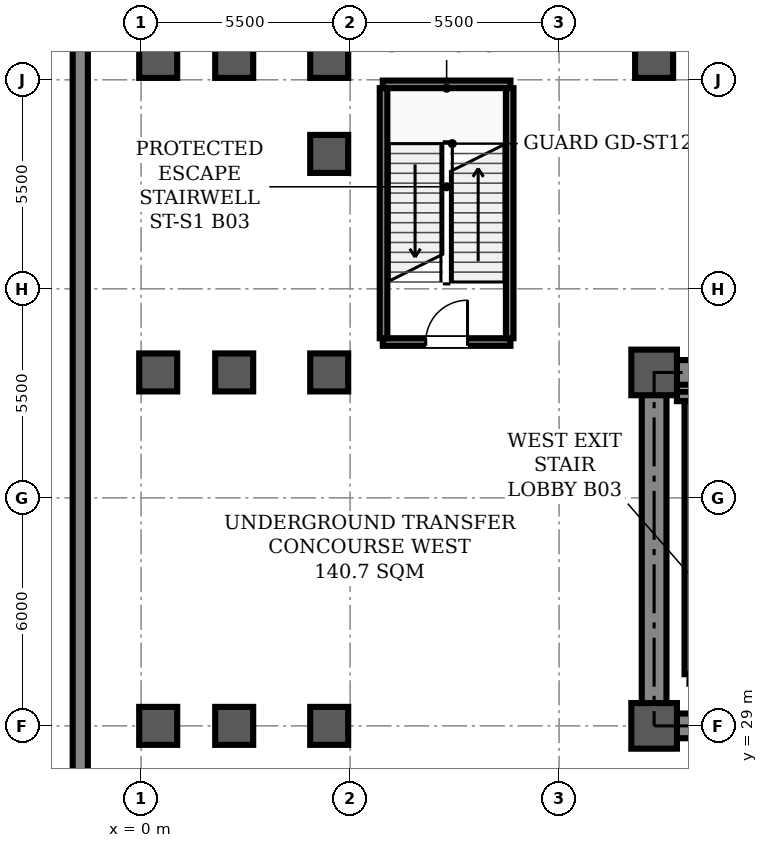
"""IFC4 building model, lengths in metres.
Left out: names, types, materials, properties, quantities, classifications, styles, units other than length and angle.
Written with IfcOpenShell. Run it as: python <this file> out.ifc"""

import sys

from ifc_helpers import new_model, si_unit, direction, frame, frame_2d, origin, origin_2d, place, context, subcontext, project, spatial, rectangle, hollow_rectangle, extrude, element, fill, save


model = new_model("IFC4")
c1 = context("Model", 3, precision=1e-05, world=origin(), true_north=direction((0.0, 1.0)))
c2 = subcontext(c1, "Body", "Model", "MODEL_VIEW")
j1 = project(units=[si_unit("LENGTHUNIT", "METRE"), si_unit("PLANEANGLEUNIT", "RADIAN")], contexts=[c1])
p1 = place(None, origin())
s1 = spatial("IfcSite", under=j1, at=p1, CompositionType="ELEMENT")
p2 = place(p1, origin())
s2 = spatial("IfcBuilding", under=s1, at=p2, CompositionType="ELEMENT")
p3 = place(p2, frame((0.0, 0.0, -15.6)))
s3 = spatial("IfcBuildingStorey", under=s2, at=p3, CompositionType="ELEMENT", Elevation=-15.6)
for number, where, z_axis, x_axis in (
    (1, (13.5, 29.0, 0.0), (0.0, 0.0, 1.0), (1.0, 0.0, 0.0)),
    (2, (13.5, 38.3, 0.0), (0.0, 0.0, 1.0), (1.0, 0.0, 0.0)),
):
    element("IfcColumn", number, at=place(p3, frame(where, z_axis=z_axis, x_axis=x_axis)), inside=s3, PredefinedType="COLUMN", context=c2, shape_type="SweptSolid", body=[
        extrude(hollow_rectangle(XDim=1.2, YDim=1.2, WallThickness=0.04, InnerFilletRadius=0.02, OuterFilletRadius=0.06, at=origin_2d()), origin(), (0.0, 0.0, 1.0), 5.4),
    ])
for number, where, z_axis, x_axis in (
    (3, (0.45, 29.0, 0.0), (0.0, 0.0, 1.0), (1.0, 0.0, 0.0)),
    (4, (0.45, 38.3, 0.0), (0.0, 0.0, 1.0), (1.0, 0.0, 0.0)),
    (5, (0.45, 46.55, 0.0), (0.0, 0.0, 1.0), (1.0, 0.0, 0.0)),
    (6, (2.45, 29.0, 0.0), (0.0, 0.0, 1.0), (1.0, 0.0, 0.0)),
    (7, (2.45, 38.3, 0.0), (0.0, 0.0, 1.0), (1.0, 0.0, 0.0)),
    (8, (2.45, 46.55, 0.0), (0.0, 0.0, 1.0), (1.0, 0.0, 0.0)),
    (9, (4.95, 29.0, 0.0), (0.0, 0.0, 1.0), (1.0, 0.0, 0.0)),
    (10, (4.95, 38.3, 0.0), (0.0, 0.0, 1.0), (1.0, 0.0, 0.0)),
    (11, (4.95, 44.05, 0.0), (0.0, 0.0, 1.0), (1.0, 0.0, 0.0)),
    (12, (4.95, 46.55, 0.0), (0.0, 0.0, 1.0), (1.0, 0.0, 0.0)),
    (13, (13.5, 46.55, 0.0), (0.0, 0.0, 1.0), (1.0, 0.0, 0.0)),
):
    element("IfcColumn", number, at=place(p3, frame(where, z_axis=z_axis, x_axis=x_axis)), inside=s3, PredefinedType="COLUMN", context=c2, shape_type="SweptSolid", body=[
        extrude(rectangle(XDim=1.0, YDim=1.0, at=origin_2d()), origin(), (0.0, 0.0, 1.0), 5.4),
    ])
p4 = place(p3, frame((-1.6, 51.4, 0.0), z_axis=(0.0, 0.0, 1.0), x_axis=(0.0, -1.0, 0.0)))
e14 = element("IfcWall", 14, at=p4, inside=s3, PredefinedType="SOLIDWALL", context=c2, shape_type="SweptSolid", body=[
    extrude(rectangle(XDim=51.2, YDim=0.4, at=frame_2d((25.6, 0.0))), origin(), (0.0, 0.0, 1.0), 5.12),
])
p5 = place(p3, frame((13.5, 29.0, 0.0), z_axis=(0.0, 0.0, 1.0), x_axis=(1.0, 0.0, 0.0)))
e15 = element("IfcWall", 15, at=p5, inside=s3, PredefinedType="SHEAR", context=c2, shape_type="SweptSolid", body=[
    extrude(rectangle(XDim=30.5, YDim=0.65, at=frame_2d((15.25, 0.0))), origin(), (0.0, 0.0, 1.0), 5.12),
])
p6 = place(p5, frame((1.75, 0.0, 0.0)))
e16 = element("IfcOpeningElement", 16, at=p6, cuts=e15, PredefinedType="OPENING", context=c2, shape_type="SweptSolid", body=[
    extrude(rectangle(XDim=1.1, YDim=2.08, at=frame_2d((0.55, 1.04))), frame((0.0, 0.335, 0.0), z_axis=(0.0, -1.0, 0.0), x_axis=(1.0, 0.0, 0.0)), (0.0, 0.0, 1.0), 0.67),
])
p7 = place(p5, frame((26.7, 0.0, 0.0)))
e17 = element("IfcOpeningElement", 17, at=p7, cuts=e15, PredefinedType="OPENING", context=c2, shape_type="SweptSolid", body=[
    extrude(rectangle(XDim=1.1, YDim=2.08, at=frame_2d((0.55, 1.04))), frame((0.0, 0.335, 0.0), z_axis=(0.0, -1.0, 0.0), x_axis=(1.0, 0.0, 0.0)), (0.0, 0.0, 1.0), 0.67),
])
p8 = place(p5, frame((6.8, 0.0, 0.0)))
e18 = element("IfcOpeningElement", 18, at=p8, cuts=e15, PredefinedType="OPENING", context=c2, shape_type="SweptSolid", body=[
    extrude(rectangle(XDim=1.1, YDim=2.08, at=frame_2d((0.55, 1.04))), frame((0.0, 0.335, 0.0), z_axis=(0.0, -1.0, 0.0), x_axis=(1.0, 0.0, 0.0)), (0.0, 0.0, 1.0), 0.67),
])
p9 = place(p5, frame((14.3, 0.0, 0.0)))
e19 = element("IfcOpeningElement", 19, at=p9, cuts=e15, PredefinedType="OPENING", context=c2, shape_type="SweptSolid", body=[
    extrude(rectangle(XDim=1.6, YDim=2.08, at=frame_2d((0.8, 1.04))), frame((0.0, 0.335, 0.0), z_axis=(0.0, -1.0, 0.0), x_axis=(1.0, 0.0, 0.0)), (0.0, 0.0, 1.0), 0.67),
])
p10 = place(p5, frame((19.53, 0.0, 0.0)))
e20 = element("IfcOpeningElement", 20, at=p10, cuts=e15, PredefinedType="OPENING", context=c2, shape_type="SweptSolid", body=[
    extrude(rectangle(XDim=0.9, YDim=2.08, at=frame_2d((0.45, 1.04))), frame((0.0, 0.335, 0.0), z_axis=(0.0, -1.0, 0.0), x_axis=(1.0, 0.0, 0.0)), (0.0, 0.0, 1.0), 0.67),
])
p11 = place(p5, frame((21.57, 0.0, 0.0)))
e21 = element("IfcOpeningElement", 21, at=p11, cuts=e15, PredefinedType="OPENING", context=c2, shape_type="SweptSolid", body=[
    extrude(rectangle(XDim=0.9, YDim=2.08, at=frame_2d((0.45, 1.04))), frame((0.0, 0.335, 0.0), z_axis=(0.0, -1.0, 0.0), x_axis=(1.0, 0.0, 0.0)), (0.0, 0.0, 1.0), 0.67),
])
p12 = place(p5, frame((12.1, 0.0, 0.0)))
e22 = element("IfcOpeningElement", 22, at=p12, cuts=e15, PredefinedType="OPENING", context=c2, shape_type="SweptSolid", body=[
    extrude(rectangle(XDim=1.3, YDim=2.08, at=frame_2d((0.65, 1.04))), frame((0.0, 0.335, 0.0), z_axis=(0.0, -1.0, 0.0), x_axis=(1.0, 0.0, 0.0)), (0.0, 0.0, 1.0), 0.67),
])
p13 = place(p3, frame((13.5, 38.3, 0.0), z_axis=(0.0, 0.0, 1.0), x_axis=(1.0, 0.0, 0.0)))
e23 = element("IfcWall", 23, at=p13, inside=s3, PredefinedType="SHEAR", context=c2, shape_type="SweptSolid", body=[
    extrude(rectangle(XDim=30.5, YDim=0.65, at=frame_2d((15.25, 0.0))), origin(), (0.0, 0.0, 1.0), 5.12),
])
p14 = place(p3, frame((13.5, 29.35, 0.0), z_axis=(0.0, 0.0, 1.0), x_axis=(0.0, 1.0, 0.0)))
e24 = element("IfcWall", 24, at=p14, inside=s3, PredefinedType="SHEAR", context=c2, shape_type="SweptSolid", body=[
    extrude(rectangle(XDim=8.6, YDim=0.65, at=frame_2d((4.3, 0.0))), origin(), (0.0, 0.0, 1.0), 5.12),
])
p15 = place(p3, frame((14.1, 37.669, 0.0), z_axis=(0.0, 0.0, 1.0), x_axis=(1.0, 0.0, 0.0)))
e25 = element("IfcWall", 25, at=p15, inside=s3, PredefinedType="STANDARD", context=c2, shape_type="SweptSolid", body=[
    extrude(rectangle(XDim=3.67, YDim=0.25, at=frame_2d((1.835, 0.0))), origin(), (0.0, 0.0, 1.0), 5.12),
])
p16 = place(p3, frame((14.425, 30.36, 0.0), z_axis=(0.0, 0.0, 1.0), x_axis=(0.0, 1.0, 0.0)))
e26 = element("IfcWall", 26, at=p16, inside=s3, PredefinedType="STANDARD", context=c2, shape_type="SweptSolid", body=[
    extrude(rectangle(XDim=7.184, YDim=0.25, at=frame_2d((3.592, 0.0))), origin(), (0.0, 0.0, 1.0), 5.12),
])
p17 = place(p3, frame((6.36, 39.1, 0.0), z_axis=(0.0, 0.0, 1.0), x_axis=(1.0, 0.0, 0.0)))
e27 = element("IfcWall", 27, at=p17, inside=s3, PredefinedType="STANDARD", context=c2, shape_type="SweptSolid", body=[
    extrude(rectangle(XDim=3.36, YDim=0.2, at=frame_2d((1.68, 0.0))), origin(), (0.0, 0.0, 1.0), 5.12),
])
p18 = place(p17, frame((1.13, 0.0, 0.0)))
e28 = element("IfcOpeningElement", 28, at=p18, cuts=e27, PredefinedType="OPENING", context=c2, shape_type="SweptSolid", body=[
    extrude(rectangle(XDim=1.1, YDim=2.08, at=frame_2d((0.55, 1.04))), frame((0.0, 0.11, 0.0), z_axis=(0.0, -1.0, 0.0), x_axis=(1.0, 0.0, 0.0)), (0.0, 0.0, 1.0), 0.22),
])
p19 = place(p3, frame((6.36, 45.88, 0.0), z_axis=(0.0, 0.0, 1.0), x_axis=(1.0, 0.0, 0.0)))
e29 = element("IfcWall", 29, at=p19, inside=s3, PredefinedType="STANDARD", context=c2, shape_type="SweptSolid", body=[
    extrude(rectangle(XDim=3.36, YDim=0.2, at=frame_2d((1.68, 0.0))), origin(), (0.0, 0.0, 1.0), 5.12),
])
for number, where, z_axis, x_axis in (
    (30, (6.38, 39.2, 0.0), (0.0, 0.0, 1.0), (0.0, 1.0, 0.0)),
    (31, (9.7, 39.2, 0.0), (0.0, 0.0, 1.0), (0.0, 1.0, 0.0)),
):
    element("IfcWall", number, at=place(p3, frame(where, z_axis=z_axis, x_axis=x_axis)), inside=s3, PredefinedType="STANDARD", context=c2, shape_type="SweptSolid", body=[
        extrude(rectangle(XDim=6.58, YDim=0.2, at=frame_2d((3.29, 0.0))), origin(), (0.0, 0.0, 1.0), 5.12),
    ])
p20 = place(p18, origin())
e32 = element("IfcDoor", 32, at=p20, inside=s3, OperationType="SINGLE_SWING_RIGHT", PredefinedType="DOOR", context=c2, shape_type="SweptSolid", body=[
    extrude(rectangle(XDim=1.1, YDim=2.08, at=frame_2d((0.55, 1.04))), frame((0.0, 0.025, 0.0), z_axis=(0.0, -1.0, 0.0), x_axis=(1.0, 0.0, 0.0)), (0.0, 0.0, 1.0), 0.05),
])
fill(e28, e32)
save(model, sys.argv[1])
